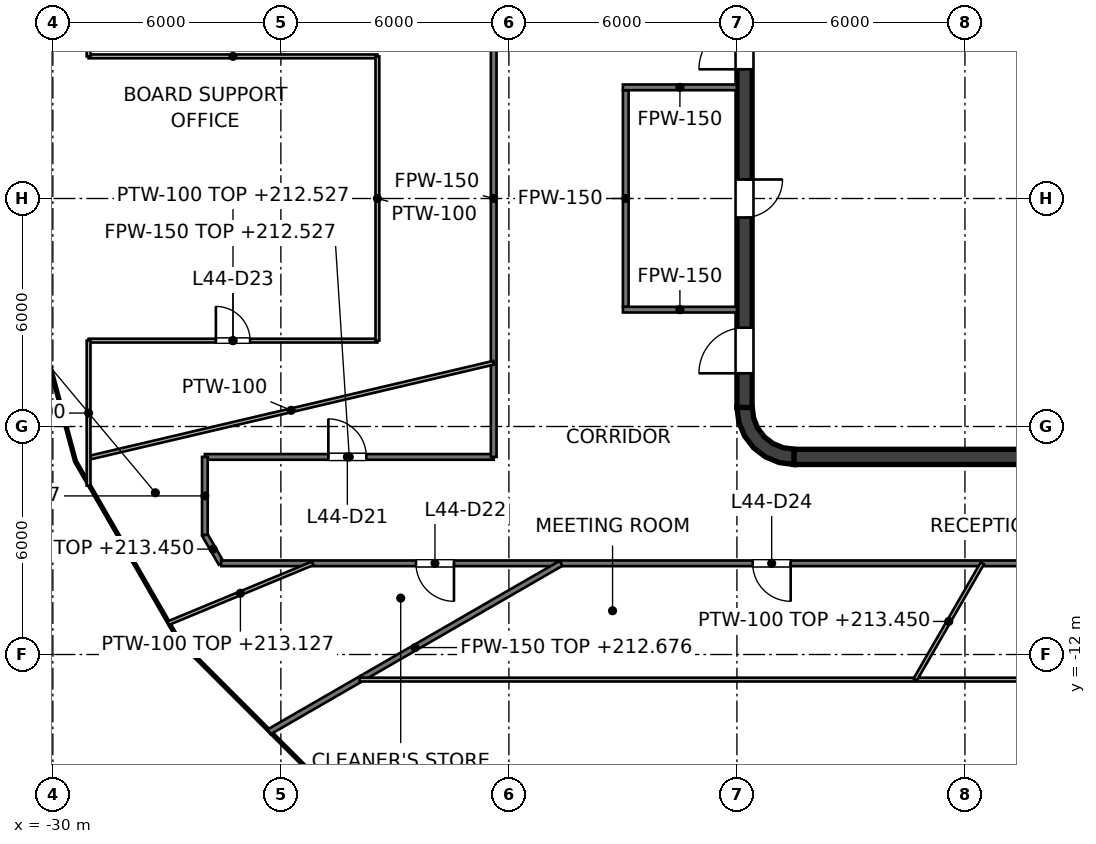
"""IFC4 building model, lengths in metres.
Left out: names, types, materials, properties, quantities, classifications, styles, units other than length and angle.
Written with IfcOpenShell. Run it as: python <this file> out.ifc"""

import sys

from ifc_helpers import new_model, si_unit, direction, frame, frame_2d, origin, place, context, subcontext, project, spatial, polyline, rectangle, outline, extrude, element, fill, save


model = new_model("IFC4")
c1 = context("Model", 3, precision=1e-05, world=origin(), true_north=direction((0.0, 1.0)))
c2 = subcontext(c1, "Body", "Model", "MODEL_VIEW")
j1 = project(units=[si_unit("LENGTHUNIT", "METRE"), si_unit("PLANEANGLEUNIT", "RADIAN")], contexts=[c1])
p1 = place(None, origin())
s1 = spatial("IfcSite", under=j1, at=p1, CompositionType="ELEMENT")
p2 = place(p1, origin())
s2 = spatial("IfcBuilding", under=s1, at=p2, CompositionType="ELEMENT")
p3 = place(p2, frame((0.0, 0.0, 209.6)))
s3 = spatial("IfcBuildingStorey", under=s2, at=p3, CompositionType="ELEMENT", Elevation=209.6)
p4 = place(p3, frame((-10.5, -6.8, 0.0), z_axis=(0.0, 0.0, 1.0), x_axis=(1.0, 0.0, 0.0)))
e1 = element("IfcWall", 1, at=p4, inside=s3, PredefinedType="SHEAR", context=c2, shape_type="SweptSolid", body=[
    extrude(rectangle(XDim=21.0, YDim=0.4, at=frame_2d((10.5, 0.0))), origin(), (0.0, 0.0, 1.0), 4.0),
])
p5 = place(p3, frame((-11.8, -5.5, 0.0), z_axis=(0.0, 0.0, 1.0), x_axis=(0.0, 1.0, 0.0)))
e2 = element("IfcWall", 2, at=p5, inside=s3, PredefinedType="SHEAR", context=c2, shape_type="SweptSolid", body=[
    extrude(rectangle(XDim=11.0, YDim=0.4, at=frame_2d((5.5, 0.0))), origin(), (0.0, 0.0, 1.0), 4.0),
])
p6 = place(p5, frame((5.0, 0.0, 0.0)))
e3 = element("IfcOpeningElement", 3, at=p6, cuts=e2, PredefinedType="OPENING", context=c2, shape_type="SweptSolid", body=[
    extrude(rectangle(XDim=1.0, YDim=2.1, at=frame_2d((0.5, 1.05))), frame((0.0, 0.2, 0.0), z_axis=(0.0, -1.0, 0.0), x_axis=(1.0, 0.0, 0.0)), (0.0, 0.0, 1.0), 0.4),
])
p7 = place(p5, frame((0.9, 0.0, 0.0)))
e4 = element("IfcOpeningElement", 4, at=p7, cuts=e2, PredefinedType="OPENING", context=c2, shape_type="SweptSolid", body=[
    extrude(rectangle(XDim=1.2, YDim=2.1, at=frame_2d((0.6, 1.05))), frame((0.0, 0.2, 0.0), z_axis=(0.0, -1.0, 0.0), x_axis=(1.0, 0.0, 0.0)), (0.0, 0.0, 1.0), 0.4),
])
p8 = place(p5, frame((8.9, 0.0, 0.0)))
e5 = element("IfcOpeningElement", 5, at=p8, cuts=e2, PredefinedType="OPENING", context=c2, shape_type="SweptSolid", body=[
    extrude(rectangle(XDim=1.2, YDim=2.1, at=frame_2d((0.6, 1.05))), frame((0.0, 0.2, 0.0), z_axis=(0.0, -1.0, 0.0), x_axis=(1.0, 0.0, 0.0)), (0.0, 0.0, 1.0), 0.4),
])
p9 = place(p3, origin())
e6 = element("IfcWall", 6, at=p9, inside=s3, PredefinedType="SHEAR", context=c2, shape_type="SweptSolid", body=[
    extrude(outline(polyline([(-10.5, -7.0), (-10.5, -6.596), (-10.784, -6.559), (-11.048, -6.45), (-11.275, -6.275), (-11.45, -6.048), (-11.559, -5.784), (-11.596, -5.5), (-12.0, -5.5), (-11.949, -5.888), (-11.799, -6.25), (-11.561, -6.561), (-11.25, -6.799), (-10.888, -6.949), (-10.5, -7.0)])), origin(), (0.0, 0.0, 1.0), 4.0),
])
p10 = place(p3, frame((-9.0, -6.6, 0.0), z_axis=(0.0, 0.0, 1.0), x_axis=(0.0, 1.0, 0.0)))
e7 = element("IfcWall", 7, at=p10, inside=s3, PredefinedType="PARTITIONING", context=c2, shape_type="SweptSolid", body=[
    extrude(rectangle(XDim=2.5, YDim=0.25, at=frame_2d((1.25, 0.0))), origin(), (0.0, 0.0, 1.0), 3.85),
])
p11 = place(p10, frame((0.75, 0.0, 0.0)))
e8 = element("IfcOpeningElement", 8, at=p11, cuts=e7, PredefinedType="OPENING", context=c2, shape_type="SweptSolid", body=[
    extrude(rectangle(XDim=1.0, YDim=2.1, at=frame_2d((0.5, 1.05))), frame((0.0, 0.125, 0.0), z_axis=(0.0, -1.0, 0.0), x_axis=(1.0, 0.0, 0.0)), (0.0, 0.0, 1.0), 0.25),
])
p12 = place(p3, frame((-9.125, 1.525, 0.0), z_axis=(0.0, 0.0, 1.0), x_axis=(1.0, 0.0, 0.0)))
e9 = element("IfcWall", 9, at=p12, inside=s3, PredefinedType="SOLIDWALL", context=c2, shape_type="SweptSolid", body=[
    extrude(rectangle(XDim=8.35, YDim=0.25, at=frame_2d((4.175, 0.0))), origin(), (0.0, 0.0, 1.0), 3.85),
])
p13 = place(p12, frame((0.925, 0.0, 0.0)))
e10 = element("IfcOpeningElement", 10, at=p13, cuts=e9, PredefinedType="OPENING", context=c2, shape_type="SweptSolid", body=[
    extrude(rectangle(XDim=1.1, YDim=2.1, at=frame_2d((0.55, 1.05))), frame((0.0, 0.125, 0.0), z_axis=(0.0, -1.0, 0.0), x_axis=(1.0, 0.0, 0.0)), (0.0, 0.0, 1.0), 0.25),
])
p14 = place(p12, frame((3.625, 0.0, 0.0)))
e11 = element("IfcOpeningElement", 11, at=p14, cuts=e9, PredefinedType="OPENING", context=c2, shape_type="SweptSolid", body=[
    extrude(rectangle(XDim=1.1, YDim=2.1, at=frame_2d((0.55, 1.05))), frame((0.0, 0.125, 0.0), z_axis=(0.0, -1.0, 0.0), x_axis=(1.0, 0.0, 0.0)), (0.0, 0.0, 1.0), 0.25),
])
p15 = place(p12, frame((6.325, 0.0, 0.0)))
e12 = element("IfcOpeningElement", 12, at=p15, cuts=e9, PredefinedType="OPENING", context=c2, shape_type="SweptSolid", body=[
    extrude(rectangle(XDim=1.1, YDim=2.1, at=frame_2d((0.55, 1.05))), frame((0.0, 0.125, 0.0), z_axis=(0.0, -1.0, 0.0), x_axis=(1.0, 0.0, 0.0)), (0.0, 0.0, 1.0), 0.25),
])
for number, where, z_axis, x_axis in (
    (13, (-9.0, 1.65, 0.0), (0.0, 0.0, 1.0), (0.0, 1.0, 0.0)),
    (14, (-6.3, 1.65, 0.0), (0.0, 0.0, 1.0), (0.0, 1.0, 0.0)),
):
    element("IfcWall", number, at=place(p3, frame(where, z_axis=z_axis, x_axis=x_axis)), inside=s3, PredefinedType="SOLIDWALL", context=c2, shape_type="SweptSolid", body=[
        extrude(rectangle(XDim=2.2, YDim=0.25, at=frame_2d((1.1, 0.0))), origin(), (0.0, 0.0, 1.0), 3.85),
    ])
p16 = place(p3, frame((-9.125, -1.525, 0.0), z_axis=(0.0, 0.0, 1.0), x_axis=(1.0, 0.0, 0.0)))
e15 = element("IfcWall", 15, at=p16, inside=s3, PredefinedType="SOLIDWALL", context=c2, shape_type="SweptSolid", body=[
    extrude(rectangle(XDim=18.25, YDim=0.25, at=frame_2d((9.125, 0.0))), origin(), (0.0, 0.0, 1.0), 3.85),
])
p17 = place(p16, frame((7.15, 0.0, 0.0)))
e16 = element("IfcOpeningElement", 16, at=p17, cuts=e15, PredefinedType="OPENING", context=c2, shape_type="SweptSolid", body=[
    extrude(rectangle(XDim=1.2, YDim=2.1, at=frame_2d((0.6, 1.05))), frame((0.0, 0.125, 0.0), z_axis=(0.0, -1.0, 0.0), x_axis=(1.0, 0.0, 0.0)), (0.0, 0.0, 1.0), 0.25),
])
p18 = place(p16, frame((10.2, 0.0, 0.0)))
e17 = element("IfcOpeningElement", 17, at=p18, cuts=e15, PredefinedType="OPENING", context=c2, shape_type="SweptSolid", body=[
    extrude(rectangle(XDim=1.2, YDim=2.1, at=frame_2d((0.6, 1.05))), frame((0.0, 0.125, 0.0), z_axis=(0.0, -1.0, 0.0), x_axis=(1.0, 0.0, 0.0)), (0.0, 0.0, 1.0), 0.25),
])
p19 = place(p16, frame((16.075, 0.0, 0.0)))
e18 = element("IfcOpeningElement", 18, at=p19, cuts=e15, PredefinedType="OPENING", context=c2, shape_type="SweptSolid", body=[
    extrude(rectangle(XDim=1.0, YDim=2.1, at=frame_2d((0.5, 1.05))), frame((0.0, 0.125, 0.0), z_axis=(0.0, -1.0, 0.0), x_axis=(1.0, 0.0, 0.0)), (0.0, 0.0, 1.0), 0.25),
])
p20 = place(p3, frame((-9.125, -3.975, 0.0), z_axis=(0.0, 0.0, 1.0), x_axis=(1.0, 0.0, 0.0)))
e19 = element("IfcWall", 19, at=p20, inside=s3, PredefinedType="SOLIDWALL", context=c2, shape_type="SweptSolid", body=[
    extrude(rectangle(XDim=12.4, YDim=0.25, at=frame_2d((6.2, 0.0))), origin(), (0.0, 0.0, 1.0), 3.85),
])
p21 = place(p20, frame((1.05, 0.0, 0.0)))
e20 = element("IfcOpeningElement", 20, at=p21, cuts=e19, PredefinedType="OPENING", context=c2, shape_type="SweptSolid", body=[
    extrude(rectangle(XDim=1.2, YDim=2.1, at=frame_2d((0.6, 1.05))), frame((0.0, 0.125, 0.0), z_axis=(0.0, -1.0, 0.0), x_axis=(1.0, 0.0, 0.0)), (0.0, 0.0, 1.0), 0.25),
])
p22 = place(p20, frame((4.1, 0.0, 0.0)))
e21 = element("IfcOpeningElement", 21, at=p22, cuts=e19, PredefinedType="OPENING", context=c2, shape_type="SweptSolid", body=[
    extrude(rectangle(XDim=1.2, YDim=2.1, at=frame_2d((0.6, 1.05))), frame((0.0, 0.125, 0.0), z_axis=(0.0, -1.0, 0.0), x_axis=(1.0, 0.0, 0.0)), (0.0, 0.0, 1.0), 0.25),
])
for number, where, z_axis, x_axis in (
    (22, (-9.0, -3.85, 0.0), (0.0, 0.0, 1.0), (0.0, 1.0, 0.0)),
    (23, (-5.95, -3.85, 0.0), (0.0, 0.0, 1.0), (0.0, 1.0, 0.0)),
):
    element("IfcWall", number, at=place(p3, frame(where, z_axis=z_axis, x_axis=x_axis)), inside=s3, PredefinedType="SOLIDWALL", context=c2, shape_type="SweptSolid", body=[
        extrude(rectangle(XDim=2.2, YDim=0.25, at=frame_2d((1.1, 0.0))), origin(), (0.0, 0.0, 1.0), 3.85),
    ])
p23 = place(p3, frame((-14.925, -2.85, 0.0), z_axis=(0.0, 0.0, 1.0), x_axis=(0.0, 1.0, 0.0)))
e24 = element("IfcWall", 24, at=p23, inside=s3, PredefinedType="PARTITIONING", context=c2, shape_type="SweptSolid", body=[
    extrude(rectangle(XDim=5.7, YDim=0.15, at=frame_2d((2.85, 0.0))), origin(), (0.0, 0.0, 1.0), 2.918),
])
for number, where, z_axis, x_axis in (
    (25, (-15.0, 2.925, 0.0), (0.0, 0.0, 1.0), (1.0, 0.0, 0.0)),
    (26, (-15.0, -2.925, 0.0), (0.0, 0.0, 1.0), (1.0, 0.0, 0.0)),
):
    element("IfcWall", number, at=place(p3, frame(where, z_axis=z_axis, x_axis=x_axis)), inside=s3, PredefinedType="PARTITIONING", context=c2, shape_type="SweptSolid", body=[
        extrude(rectangle(XDim=3.0, YDim=0.15, at=frame_2d((1.5, 0.0))), origin(), (0.0, 0.0, 1.0), 2.918),
    ])
p24 = place(p3, frame((-26.0, -8.853, 0.0), z_axis=(0.0, 0.0, 1.0), x_axis=(0.499640762619, -0.866232710263, 0.0)))
e27 = element("IfcWall", 27, at=p24, inside=s3, PredefinedType="PARTITIONING", context=c2, shape_type="SweptSolid", body=[
    extrude(rectangle(XDim=0.863, YDim=0.15, at=frame_2d((0.431, 0.0))), origin(), (0.0, 0.0, 1.0), 3.85),
])
p25 = place(p3, frame((-25.569, -9.6, 0.0), z_axis=(0.0, 0.0, 1.0), x_axis=(1.0, 0.0, 0.0)))
e28 = element("IfcWall", 28, at=p25, inside=s3, PredefinedType="PARTITIONING", context=c2, shape_type="SweptSolid", body=[
    extrude(rectangle(XDim=51.138, YDim=0.15, at=frame_2d((25.569, 0.0))), origin(), (0.0, 0.0, 1.0), 2.918),
])
p26 = place(p25, frame((5.124, 0.0, 0.0)))
e29 = element("IfcOpeningElement", 29, at=p26, cuts=e28, PredefinedType="OPENING", context=c2, shape_type="SweptSolid", body=[
    extrude(rectangle(XDim=1.0, YDim=2.1, at=frame_2d((0.5, 1.05))), frame((0.0, 0.075, 0.0), z_axis=(0.0, -1.0, 0.0), x_axis=(1.0, 0.0, 0.0)), (0.0, 0.0, 1.0), 0.15),
])
p27 = place(p25, frame((13.983, 0.0, 0.0)))
e30 = element("IfcOpeningElement", 30, at=p27, cuts=e28, PredefinedType="OPENING", context=c2, shape_type="SweptSolid", body=[
    extrude(rectangle(XDim=1.0, YDim=2.1, at=frame_2d((0.5, 1.05))), frame((0.0, 0.075, 0.0), z_axis=(0.0, -1.0, 0.0), x_axis=(1.0, 0.0, 0.0)), (0.0, 0.0, 1.0), 0.15),
])
p28 = place(p25, frame((23.533, 0.0, 0.0)))
e31 = element("IfcOpeningElement", 31, at=p28, cuts=e28, PredefinedType="OPENING", context=c2, shape_type="SweptSolid", body=[
    extrude(rectangle(XDim=1.0, YDim=2.1, at=frame_2d((0.5, 1.05))), frame((0.0, 0.075, 0.0), z_axis=(0.0, -1.0, 0.0), x_axis=(1.0, 0.0, 0.0)), (0.0, 0.0, 1.0), 0.15),
])
p29 = place(p25, frame((29.847, 0.0, 0.0)))
e32 = element("IfcOpeningElement", 32, at=p29, cuts=e28, PredefinedType="OPENING", context=c2, shape_type="SweptSolid", body=[
    extrude(rectangle(XDim=1.0, YDim=2.1, at=frame_2d((0.5, 1.05))), frame((0.0, 0.075, 0.0), z_axis=(0.0, -1.0, 0.0), x_axis=(1.0, 0.0, 0.0)), (0.0, 0.0, 1.0), 0.15),
])
p30 = place(p25, frame((36.2, 0.0, 0.0)))
e33 = element("IfcOpeningElement", 33, at=p30, cuts=e28, PredefinedType="OPENING", context=c2, shape_type="SweptSolid", body=[
    extrude(rectangle(XDim=1.0, YDim=2.1, at=frame_2d((0.5, 1.05))), frame((0.0, 0.075, 0.0), z_axis=(0.0, -1.0, 0.0), x_axis=(1.0, 0.0, 0.0)), (0.0, 0.0, 1.0), 0.15),
])
p31 = place(p25, frame((45.393, 0.0, 0.0)))
e34 = element("IfcOpeningElement", 34, at=p31, cuts=e28, PredefinedType="OPENING", context=c2, shape_type="SweptSolid", body=[
    extrude(rectangle(XDim=1.2, YDim=2.1, at=frame_2d((0.6, 1.05))), frame((0.0, 0.075, 0.0), z_axis=(0.0, -1.0, 0.0), x_axis=(1.0, 0.0, 0.0)), (0.0, 0.0, 1.0), 0.15),
])
p32 = place(p3, frame((-26.0, -6.8, 0.0), z_axis=(0.0, 0.0, 1.0), x_axis=(1.0, 0.0, 0.0)))
e35 = element("IfcWall", 35, at=p32, inside=s3, PredefinedType="PARTITIONING", context=c2, shape_type="SweptSolid", body=[
    extrude(rectangle(XDim=7.6, YDim=0.15, at=frame_2d((3.8, 0.0))), origin(), (0.0, 0.0, 1.0), 2.927),
])
p33 = place(p32, frame((3.249, 0.0, 0.0)))
e36 = element("IfcOpeningElement", 36, at=p33, cuts=e35, PredefinedType="OPENING", context=c2, shape_type="SweptSolid", body=[
    extrude(rectangle(XDim=1.0, YDim=2.1, at=frame_2d((0.5, 1.05))), frame((0.0, 0.075, 0.0), z_axis=(0.0, -1.0, 0.0), x_axis=(1.0, 0.0, 0.0)), (0.0, 0.0, 1.0), 0.15),
])
p34 = place(p3, frame((-24.308, -14.034, 0.0), z_axis=(0.0, 0.0, 1.0), x_axis=(0.866040718929, 0.499973472454, 0.0)))
e37 = element("IfcWall", 37, at=p34, inside=s3, PredefinedType="PARTITIONING", context=c2, shape_type="SweptSolid", body=[
    extrude(rectangle(XDim=8.868, YDim=0.15, at=frame_2d((4.434, 0.0))), origin(), (0.0, 0.0, 1.0), 3.076),
])
p35 = place(p3, frame((-18.4, -6.8, 0.0), z_axis=(0.0, 0.0, 1.0), x_axis=(0.0, 1.0, 0.0)))
e38 = element("IfcWall", 38, at=p35, inside=s3, PredefinedType="PARTITIONING", context=c2, shape_type="SweptSolid", body=[
    extrude(rectangle(XDim=13.6, YDim=0.15, at=frame_2d((6.8, 0.0))), origin(), (0.0, 0.0, 1.0), 2.918),
])
p36 = place(p3, frame((-26.0, -8.853, 0.0), z_axis=(0.0, 0.0, 1.0), x_axis=(0.0, 1.0, 0.0)))
e39 = element("IfcWall", 39, at=p36, inside=s3, PredefinedType="PARTITIONING", context=c2, shape_type="SweptSolid", body=[
    extrude(rectangle(XDim=2.053, YDim=0.15, at=frame_2d((1.026, 0.0))), origin(), (0.0, 0.0, 1.0), 2.927),
])
p37 = place(p3, frame((-21.928, -12.66, 0.0), z_axis=(0.0, 0.0, 1.0), x_axis=(1.0, 0.0, 0.0)))
e40 = element("IfcWall", 40, at=p37, inside=s3, PredefinedType="PARTITIONING", context=c2, shape_type="SweptSolid", body=[
    extrude(rectangle(XDim=47.609, YDim=0.1, at=frame_2d((23.804, 0.0))), origin(), (0.0, 0.0, 1.0), 2.918),
])
p38 = place(p37, frame((19.02, 0.0, 0.0)))
e41 = element("IfcOpeningElement", 41, at=p38, cuts=e40, PredefinedType="OPENING", context=c2, shape_type="SweptSolid", body=[
    extrude(rectangle(XDim=1.8, YDim=2.1, at=frame_2d((0.9, 1.05))), frame((0.0, 0.05, 0.0), z_axis=(0.0, -1.0, 0.0), x_axis=(1.0, 0.0, 0.0)), (0.0, 0.0, 1.0), 0.1),
])
p39 = place(p37, frame((43.993, 0.0, 0.0)))
e42 = element("IfcOpeningElement", 42, at=p39, cuts=e40, PredefinedType="OPENING", context=c2, shape_type="SweptSolid", body=[
    extrude(rectangle(XDim=1.8, YDim=2.1, at=frame_2d((0.9, 1.05))), frame((0.0, 0.05, 0.0), z_axis=(0.0, -1.0, 0.0), x_axis=(1.0, 0.0, 0.0)), (0.0, 0.0, 1.0), 0.1),
])
p40 = place(p3, frame((-29.06, -3.74, 0.0), z_axis=(0.0, 0.0, 1.0), x_axis=(1.0, 0.0, 0.0)))
e43 = element("IfcWall", 43, at=p40, inside=s3, PredefinedType="PARTITIONING", context=c2, shape_type="SweptSolid", body=[
    extrude(rectangle(XDim=7.6, YDim=0.1, at=frame_2d((3.8, 0.0))), origin(), (0.0, 0.0, 1.0), 2.927),
])
p41 = place(p40, frame((3.35, 0.0, 0.0)))
e44 = element("IfcOpeningElement", 44, at=p41, cuts=e43, PredefinedType="OPENING", context=c2, shape_type="SweptSolid", body=[
    extrude(rectangle(XDim=0.9, YDim=2.1, at=frame_2d((0.45, 1.05))), frame((0.0, 0.05, 0.0), z_axis=(0.0, -1.0, 0.0), x_axis=(1.0, 0.0, 0.0)), (0.0, 0.0, 1.0), 0.1),
])
p42 = place(p3, frame((-29.06, 3.74, 0.0), z_axis=(0.0, 0.0, 1.0), x_axis=(1.0, 0.0, 0.0)))
e45 = element("IfcWall", 45, at=p42, inside=s3, PredefinedType="PARTITIONING", context=c2, shape_type="SweptSolid", body=[
    extrude(rectangle(XDim=7.6, YDim=0.1, at=frame_2d((3.8, 0.0))), origin(), (0.0, 0.0, 1.0), 2.927),
])
p43 = place(p3, frame((-29.06, -6.826, 0.0), z_axis=(0.0, 0.0, 1.0), x_axis=(0.973505984195, 0.228661537511, 0.0)))
e46 = element("IfcWall", 46, at=p43, inside=s3, PredefinedType="PARTITIONING", context=c2, shape_type="SweptSolid", body=[
    extrude(rectangle(XDim=10.95, YDim=0.1, at=frame_2d((5.475, 0.0))), origin(), (0.0, 0.0, 1.0), 2.918),
])
p44 = place(p3, frame((-26.967, -11.177, 0.0), z_axis=(0.0, 0.0, 1.0), x_axis=(0.923806551169, 0.382859577414, 0.0)))
e47 = element("IfcWall", 47, at=p44, inside=s3, PredefinedType="PARTITIONING", context=c2, shape_type="SweptSolid", body=[
    extrude(rectangle(XDim=4.119, YDim=0.1, at=frame_2d((2.059, 0.0))), origin(), (0.0, 0.0, 1.0), 3.527),
])
p45 = place(p3, frame((-7.309, -12.66, 0.0), z_axis=(0.0, 0.0, 1.0), x_axis=(0.499899920428, 0.866083177042, 0.0)))
e48 = element("IfcWall", 48, at=p45, inside=s3, PredefinedType="PARTITIONING", context=c2, shape_type="SweptSolid", body=[
    extrude(rectangle(XDim=3.533, YDim=0.1, at=frame_2d((1.767, 0.0))), origin(), (0.0, 0.0, 1.0), 3.85),
])
p46 = place(p3, frame((-21.46, -3.74, 0.0), z_axis=(0.0, 0.0, 1.0), x_axis=(0.0, 1.0, 0.0)))
e49 = element("IfcWall", 49, at=p46, inside=s3, PredefinedType="PARTITIONING", context=c2, shape_type="SweptSolid", body=[
    extrude(rectangle(XDim=7.48, YDim=0.1, at=frame_2d((3.74, 0.0))), origin(), (0.0, 0.0, 1.0), 2.918),
])
for number, where, z_axis, x_axis in (
    (50, (-29.06, -7.553, 0.0), (0.0, 0.0, 1.0), (0.0, 1.0, 0.0)),
    (51, (-29.06, 3.74, 0.0), (0.0, 0.0, 1.0), (0.0, 1.0, 0.0)),
):
    element("IfcWall", number, at=place(p3, frame(where, z_axis=z_axis, x_axis=x_axis)), inside=s3, PredefinedType="PARTITIONING", context=c2, shape_type="SweptSolid", body=[
        extrude(rectangle(XDim=3.813, YDim=0.1, at=frame_2d((1.906, 0.0))), origin(), (0.0, 0.0, 1.0), 2.918),
    ])
p47 = place(p13, origin())
e52 = element("IfcDoor", 52, at=p47, inside=s3, OperationType="DOUBLE_DOOR_SLIDING", PredefinedType="DOOR", context=c2, shape_type="SweptSolid", body=[
    extrude(rectangle(XDim=1.1, YDim=2.1, at=frame_2d((0.55, 1.05))), frame((0.0, 0.025, 0.0), z_axis=(0.0, -1.0, 0.0), x_axis=(1.0, 0.0, 0.0)), (0.0, 0.0, 1.0), 0.05),
])
fill(e10, e52)
p48 = place(p14, origin())
e53 = element("IfcDoor", 53, at=p48, inside=s3, OperationType="DOUBLE_DOOR_SLIDING", PredefinedType="DOOR", context=c2, shape_type="SweptSolid", body=[
    extrude(rectangle(XDim=1.1, YDim=2.1, at=frame_2d((0.55, 1.05))), frame((0.0, 0.025, 0.0), z_axis=(0.0, -1.0, 0.0), x_axis=(1.0, 0.0, 0.0)), (0.0, 0.0, 1.0), 0.05),
])
fill(e11, e53)
p49 = place(p21, origin())
e54 = element("IfcDoor", 54, at=p49, inside=s3, OperationType="DOUBLE_DOOR_SLIDING", PredefinedType="DOOR", context=c2, shape_type="SweptSolid", body=[
    extrude(rectangle(XDim=1.2, YDim=2.1, at=frame_2d((0.6, 1.05))), frame((0.0, 0.025, 0.0), z_axis=(0.0, -1.0, 0.0), x_axis=(1.0, 0.0, 0.0)), (0.0, 0.0, 1.0), 0.05),
])
fill(e20, e54)
p50 = place(p22, origin())
e55 = element("IfcDoor", 55, at=p50, inside=s3, OperationType="DOUBLE_DOOR_SLIDING", PredefinedType="DOOR", context=c2, shape_type="SweptSolid", body=[
    extrude(rectangle(XDim=1.2, YDim=2.1, at=frame_2d((0.6, 1.05))), frame((0.0, 0.025, 0.0), z_axis=(0.0, -1.0, 0.0), x_axis=(1.0, 0.0, 0.0)), (0.0, 0.0, 1.0), 0.05),
])
fill(e21, e55)
p51 = place(p11, origin())
e56 = element("IfcDoor", 56, at=p51, inside=s3, OperationType="SINGLE_SWING_LEFT", PredefinedType="DOOR", context=c2, shape_type="SweptSolid", body=[
    extrude(rectangle(XDim=1.0, YDim=2.1, at=frame_2d((0.5, 1.05))), frame((0.0, 0.025, 0.0), z_axis=(0.0, -1.0, 0.0), x_axis=(1.0, 0.0, 0.0)), (0.0, 0.0, 1.0), 0.05),
])
fill(e8, e56)
p52 = place(p6, origin())
e57 = element("IfcDoor", 57, at=p52, inside=s3, OperationType="SINGLE_SWING_RIGHT", PredefinedType="DOOR", context=c2, shape_type="SweptSolid", body=[
    extrude(rectangle(XDim=1.0, YDim=2.1, at=frame_2d((0.5, 1.05))), frame((0.0, 0.025, 0.0), z_axis=(0.0, -1.0, 0.0), x_axis=(1.0, 0.0, 0.0)), (0.0, 0.0, 1.0), 0.05),
])
fill(e3, e57)
p53 = place(p7, origin())
e58 = element("IfcDoor", 58, at=p53, inside=s3, OperationType="SINGLE_SWING_LEFT", PredefinedType="DOOR", context=c2, shape_type="SweptSolid", body=[
    extrude(rectangle(XDim=1.2, YDim=2.1, at=frame_2d((0.6, 1.05))), frame((0.0, 0.025, 0.0), z_axis=(0.0, -1.0, 0.0), x_axis=(1.0, 0.0, 0.0)), (0.0, 0.0, 1.0), 0.05),
])
fill(e4, e58)
p54 = place(p8, origin())
e59 = element("IfcDoor", 59, at=p54, inside=s3, OperationType="SINGLE_SWING_LEFT", PredefinedType="DOOR", context=c2, shape_type="SweptSolid", body=[
    extrude(rectangle(XDim=1.2, YDim=2.1, at=frame_2d((0.6, 1.05))), frame((0.0, 0.025, 0.0), z_axis=(0.0, -1.0, 0.0), x_axis=(1.0, 0.0, 0.0)), (0.0, 0.0, 1.0), 0.05),
])
fill(e5, e59)
p55 = place(p33, origin())
e60 = element("IfcDoor", 60, at=p55, inside=s3, OperationType="SINGLE_SWING_LEFT", PredefinedType="DOOR", context=c2, shape_type="SweptSolid", body=[
    extrude(rectangle(XDim=1.0, YDim=2.1, at=frame_2d((0.5, 1.05))), frame((0.0, 0.025, 0.0), z_axis=(0.0, -1.0, 0.0), x_axis=(1.0, 0.0, 0.0)), (0.0, 0.0, 1.0), 0.05),
])
fill(e36, e60)
p56 = place(p26, origin())
e61 = element("IfcDoor", 61, at=p56, inside=s3, OperationType="SINGLE_SWING_RIGHT", PredefinedType="DOOR", context=c2, shape_type="SweptSolid", body=[
    extrude(rectangle(XDim=1.0, YDim=2.1, at=frame_2d((0.5, 1.05))), frame((0.0, 0.025, 0.0), z_axis=(0.0, -1.0, 0.0), x_axis=(1.0, 0.0, 0.0)), (0.0, 0.0, 1.0), 0.05),
])
fill(e29, e61)
p57 = place(p41, origin())
e62 = element("IfcDoor", 62, at=p57, inside=s3, OperationType="SINGLE_SWING_LEFT", PredefinedType="DOOR", context=c2, shape_type="SweptSolid", body=[
    extrude(rectangle(XDim=0.9, YDim=2.1, at=frame_2d((0.45, 1.05))), frame((0.0, 0.025, 0.0), z_axis=(0.0, -1.0, 0.0), x_axis=(1.0, 0.0, 0.0)), (0.0, 0.0, 1.0), 0.05),
])
fill(e44, e62)
p58 = place(p27, origin())
e63 = element("IfcDoor", 63, at=p58, inside=s3, OperationType="SINGLE_SWING_RIGHT", PredefinedType="DOOR", context=c2, shape_type="SweptSolid", body=[
    extrude(rectangle(XDim=1.0, YDim=2.1, at=frame_2d((0.5, 1.05))), frame((0.0, 0.025, 0.0), z_axis=(0.0, -1.0, 0.0), x_axis=(1.0, 0.0, 0.0)), (0.0, 0.0, 1.0), 0.05),
])
fill(e30, e63)
save(model, sys.argv[1])
